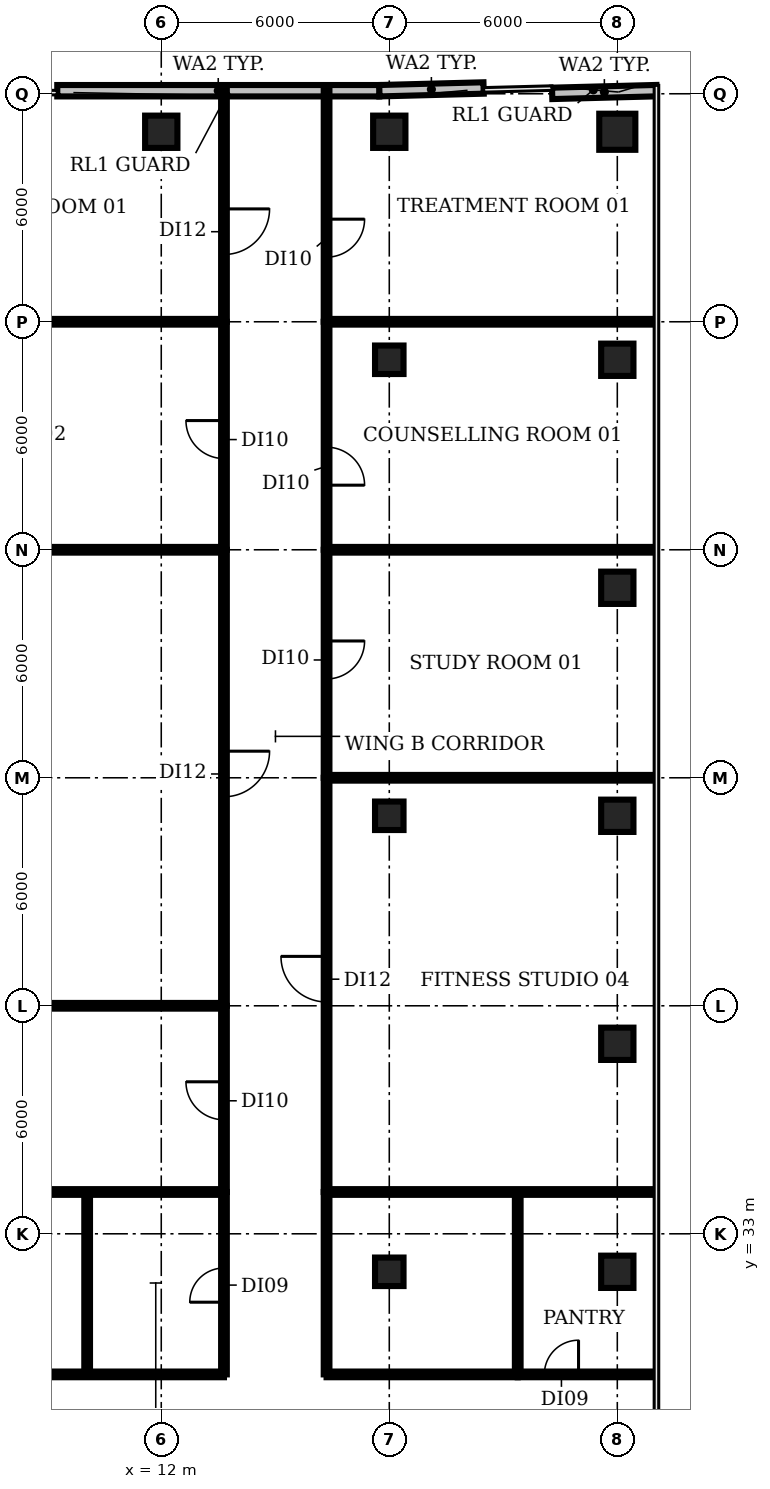
"""IFC4 building model, lengths in metres.
Left out: names, types, materials, properties, quantities, classifications, styles, units other than length and angle.
Written with IfcOpenShell. Run it as: python <this file> out.ifc"""

import sys

from ifc_helpers import new_model, si_unit, direction, frame, frame_2d, origin, origin_2d, place, context, subcontext, project, spatial, rectangle, circle, extrude, element, fill, save


model = new_model("IFC4")
c1 = context("Model", 3, precision=1e-05, world=origin(), true_north=direction((0.0, 1.0)))
c2 = subcontext(c1, "Body", "Model", "MODEL_VIEW")
j1 = project(units=[si_unit("LENGTHUNIT", "METRE"), si_unit("PLANEANGLEUNIT", "RADIAN")], contexts=[c1])
p1 = place(None, origin())
s1 = spatial("IfcSite", under=j1, at=p1, CompositionType="ELEMENT")
p2 = place(p1, origin())
s2 = spatial("IfcBuilding", under=s1, at=p2, CompositionType="ELEMENT")
p3 = place(p2, frame((0.0, 0.0, 176.0)))
s3 = spatial("IfcBuildingStorey", under=s2, at=p3, CompositionType="ELEMENT", Elevation=176.0)
p4 = place(p3, frame((12.0, 62.0, 0.0), z_axis=(0.0, 0.0, 1.0), x_axis=(1.0, 0.0, 0.0)))
e1 = element("IfcColumn", 1, at=p4, inside=s3, PredefinedType="COLUMN", context=c2, shape_type="SweptSolid", body=[
    extrude(rectangle(XDim=0.85, YDim=0.85, at=origin_2d()), origin(), (0.0, 0.0, 1.0), 3.85),
])
for number, where, z_axis, x_axis in (
    (2, (18.0, 32.0, 0.0), (0.0, 0.0, 1.0), (1.0, 0.0, 0.0)),
    (3, (18.0, 44.0, 0.0), (0.0, 0.0, 1.0), (1.0, 0.0, 0.0)),
    (4, (18.0, 56.0, 0.0), (0.0, 0.0, 1.0), (1.0, 0.0, 0.0)),
):
    element("IfcColumn", number, at=place(p3, frame(where, z_axis=z_axis, x_axis=x_axis)), inside=s3, PredefinedType="COLUMN", context=c2, shape_type="SweptSolid", body=[
        extrude(rectangle(XDim=0.75, YDim=0.75, at=origin_2d()), origin(), (0.0, 0.0, 1.0), 3.85),
    ])
for number, where, z_axis, x_axis in (
    (5, (18.0, 62.0, 0.0), (0.0, 0.0, 1.0), (1.0, 0.0, 0.0)),
    (6, (24.0, 32.0, 0.0), (0.0, 0.0, 1.0), (1.0, 0.0, 0.0)),
    (7, (24.0, 38.0, 0.0), (0.0, 0.0, 1.0), (1.0, 0.0, 0.0)),
    (8, (24.0, 44.0, 0.0), (0.0, 0.0, 1.0), (1.0, 0.0, 0.0)),
    (9, (24.0, 50.0, 0.0), (0.0, 0.0, 1.0), (1.0, 0.0, 0.0)),
    (10, (24.0, 56.0, 0.0), (0.0, 0.0, 1.0), (1.0, 0.0, 0.0)),
):
    element("IfcColumn", number, at=place(p3, frame(where, z_axis=z_axis, x_axis=x_axis)), inside=s3, PredefinedType="COLUMN", context=c2, shape_type="SweptSolid", body=[
        extrude(rectangle(XDim=0.85, YDim=0.85, at=origin_2d()), origin(), (0.0, 0.0, 1.0), 3.85),
    ])
p5 = place(p3, frame((24.0, 62.0, 0.0), z_axis=(0.0, 0.0, 1.0), x_axis=(1.0, 0.0, 0.0)))
e11 = element("IfcColumn", 11, at=p5, inside=s3, PredefinedType="COLUMN", context=c2, shape_type="SweptSolid", body=[
    extrude(circle(Radius=0.475, at=origin_2d()), origin(), (0.0, 0.0, 1.0), 3.85),
])
for number, where, z_axis, x_axis in (
    (12, (25.034, 63.082, 0.0), (0.0, 0.0, 1.0), (-1.0, -0.026, 0.0)),
    (13, (20.482, 63.152, 0.0), (0.0, 0.0, 1.0), (-1.0, -0.026, 0.0)),
):
    element("IfcWall", number, at=place(p3, frame(where, z_axis=z_axis, x_axis=x_axis)), inside=s3, PredefinedType="SOLIDWALL", context=c2, shape_type="SweptSolid", body=[
        extrude(rectangle(XDim=2.749, YDim=0.3, at=frame_2d((1.375, 0.0))), origin(), (0.0, 0.0, 1.0), 3.85),
    ])
p6 = place(p3, frame((17.735, 63.08, 0.0), z_axis=(0.0, 0.0, 1.0), x_axis=(-1.0, 0.0, 0.0)))
e14 = element("IfcWall", 14, at=p6, inside=s3, PredefinedType="SOLIDWALL", context=c2, shape_type="SweptSolid", body=[
    extrude(rectangle(XDim=8.471, YDim=0.3, at=frame_2d((4.236, 0.0))), origin(), (0.0, 0.0, 1.0), 3.85),
])
p7 = place(p3, frame((-1.79, 57.0, 0.0), z_axis=(0.0, 0.0, 1.0), x_axis=(1.0, 0.0, 0.0)))
e15 = element("IfcWall", 15, at=p7, inside=s3, PredefinedType="PARTITIONING", context=c2, shape_type="SweptSolid", body=[
    extrude(rectangle(XDim=15.44, YDim=0.15, at=frame_2d((7.72, 0.0))), origin(), (0.0, 0.0, 1.0), 2.88),
])
p8 = place(p3, frame((-1.63, 51.0, 0.0), z_axis=(0.0, 0.0, 1.0), x_axis=(1.0, 0.0, 0.0)))
e16 = element("IfcWall", 16, at=p8, inside=s3, PredefinedType="PARTITIONING", context=c2, shape_type="SweptSolid", body=[
    extrude(rectangle(XDim=15.28, YDim=0.15, at=frame_2d((7.64, 0.0))), origin(), (0.0, 0.0, 1.0), 2.88),
])
p9 = place(p3, frame((-1.32, 39.0, 0.0), z_axis=(0.0, 0.0, 1.0), x_axis=(1.0, 0.0, 0.0)))
e17 = element("IfcWall", 17, at=p9, inside=s3, PredefinedType="PARTITIONING", context=c2, shape_type="SweptSolid", body=[
    extrude(rectangle(XDim=14.97, YDim=0.15, at=frame_2d((7.485, 0.0))), origin(), (0.0, 0.0, 1.0), 2.88),
])
p10 = place(p3, frame((-1.19, 34.1, 0.0), z_axis=(0.0, 0.0, 1.0), x_axis=(1.0, 0.0, 0.0)))
e18 = element("IfcWall", 18, at=p10, inside=s3, PredefinedType="PARTITIONING", context=c2, shape_type="SweptSolid", body=[
    extrude(rectangle(XDim=14.84, YDim=0.15, at=frame_2d((7.42, 0.0))), origin(), (0.0, 0.0, 1.0), 2.88),
])
p11 = place(p3, frame((8.8, 29.3, 0.0), z_axis=(0.0, 0.0, 1.0), x_axis=(1.0, 0.0, 0.0)))
e19 = element("IfcWall", 19, at=p11, inside=s3, PredefinedType="PARTITIONING", context=c2, shape_type="SweptSolid", body=[
    extrude(rectangle(XDim=4.85, YDim=0.15, at=frame_2d((2.425, 0.0))), origin(), (0.0, 0.0, 1.0), 2.88),
])
p12 = place(p3, frame((10.05, 29.3, 0.0), z_axis=(0.0, 0.0, 1.0), x_axis=(0.0, 1.0, 0.0)))
e20 = element("IfcWall", 20, at=p12, inside=s3, PredefinedType="PARTITIONING", context=c2, shape_type="SweptSolid", body=[
    extrude(rectangle(XDim=4.8, YDim=0.15, at=frame_2d((2.4, 0.0))), origin(), (0.0, 0.0, 1.0), 2.88),
])
p13 = place(p3, frame((13.65, 29.3, 0.0), z_axis=(0.0, 0.0, 1.0), x_axis=(0.0, 1.0, 0.0)))
e21 = element("IfcWall", 21, at=p13, inside=s3, PredefinedType="PARTITIONING", context=c2, shape_type="SweptSolid", body=[
    extrude(rectangle(XDim=4.8, YDim=0.15, at=frame_2d((2.4, 0.0))), origin(), (0.0, 0.0, 1.0), 2.88),
])
p14 = place(p13, frame((1.9, 0.0, 0.0)))
e22 = element("IfcOpeningElement", 22, at=p14, cuts=e21, PredefinedType="OPENING", context=c2, shape_type="SweptSolid", body=[
    extrude(rectangle(XDim=0.9, YDim=2.1, at=frame_2d((0.45, 1.05))), frame((0.0, 0.085, 0.0), z_axis=(0.0, -1.0, 0.0), x_axis=(1.0, 0.0, 0.0)), (0.0, 0.0, 1.0), 0.17),
])
p15 = place(p3, frame((13.65, 34.1, 0.0), z_axis=(0.0, 0.0, 1.0), x_axis=(0.0, 1.0, 0.0)))
e23 = element("IfcWall", 23, at=p15, inside=s3, PredefinedType="PARTITIONING", context=c2, shape_type="SweptSolid", body=[
    extrude(rectangle(XDim=4.9, YDim=0.15, at=frame_2d((2.45, 0.0))), origin(), (0.0, 0.0, 1.0), 2.88),
])
p16 = place(p15, frame((1.9, 0.0, 0.0)))
e24 = element("IfcOpeningElement", 24, at=p16, cuts=e23, PredefinedType="OPENING", context=c2, shape_type="SweptSolid", body=[
    extrude(rectangle(XDim=1.0, YDim=2.1, at=frame_2d((0.5, 1.05))), frame((0.0, 0.085, 0.0), z_axis=(0.0, -1.0, 0.0), x_axis=(1.0, 0.0, 0.0)), (0.0, 0.0, 1.0), 0.17),
])
p17 = place(p3, frame((13.65, 51.0, 0.0), z_axis=(0.0, 0.0, 1.0), x_axis=(0.0, -1.0, 0.0)))
e25 = element("IfcWall", 25, at=p17, inside=s3, PredefinedType="PARTITIONING", context=c2, shape_type="SweptSolid", body=[
    extrude(rectangle(XDim=12.0, YDim=0.15, at=frame_2d((6.0, 0.0))), origin(), (0.0, 0.0, 1.0), 2.88),
])
p18 = place(p17, frame((5.3, 0.0, 0.0)))
e26 = element("IfcOpeningElement", 26, at=p18, cuts=e25, PredefinedType="OPENING", context=c2, shape_type="SweptSolid", body=[
    extrude(rectangle(XDim=1.2, YDim=2.1, at=frame_2d((0.6, 1.05))), frame((0.0, 0.085, 0.0), z_axis=(0.0, -1.0, 0.0), x_axis=(1.0, 0.0, 0.0)), (0.0, 0.0, 1.0), 0.17),
])
p19 = place(p3, frame((13.65, 51.0, 0.0), z_axis=(0.0, 0.0, 1.0), x_axis=(0.0, 1.0, 0.0)))
e27 = element("IfcWall", 27, at=p19, inside=s3, PredefinedType="PARTITIONING", context=c2, shape_type="SweptSolid", body=[
    extrude(rectangle(XDim=6.0, YDim=0.15, at=frame_2d((3.0, 0.0))), origin(), (0.0, 0.0, 1.0), 2.88),
])
p20 = place(p19, frame((2.4, 0.0, 0.0)))
e28 = element("IfcOpeningElement", 28, at=p20, cuts=e27, PredefinedType="OPENING", context=c2, shape_type="SweptSolid", body=[
    extrude(rectangle(XDim=1.0, YDim=2.1, at=frame_2d((0.5, 1.05))), frame((0.0, 0.085, 0.0), z_axis=(0.0, -1.0, 0.0), x_axis=(1.0, 0.0, 0.0)), (0.0, 0.0, 1.0), 0.17),
])
p21 = place(p3, frame((13.65, 63.09, 0.0), z_axis=(0.0, 0.0, 1.0), x_axis=(0.0, -1.0, 0.0)))
e29 = element("IfcWall", 29, at=p21, inside=s3, PredefinedType="PARTITIONING", context=c2, shape_type="SweptSolid", body=[
    extrude(rectangle(XDim=6.09, YDim=0.15, at=frame_2d((3.045, 0.0))), origin(), (0.0, 0.0, 1.0), 2.88),
])
p22 = place(p21, frame((3.12, 0.0, 0.0)))
e30 = element("IfcOpeningElement", 30, at=p22, cuts=e29, PredefinedType="OPENING", context=c2, shape_type="SweptSolid", body=[
    extrude(rectangle(XDim=1.2, YDim=2.1, at=frame_2d((0.6, 1.05))), frame((0.0, 0.085, 0.0), z_axis=(0.0, -1.0, 0.0), x_axis=(1.0, 0.0, 0.0)), (0.0, 0.0, 1.0), 0.17),
])
p23 = place(p3, frame((16.35, 29.3, 0.0), z_axis=(0.0, 0.0, 1.0), x_axis=(0.0, 1.0, 0.0)))
e31 = element("IfcWall", 31, at=p23, inside=s3, PredefinedType="PARTITIONING", context=c2, shape_type="SweptSolid", body=[
    extrude(rectangle(XDim=4.8, YDim=0.15, at=frame_2d((2.4, 0.0))), origin(), (0.0, 0.0, 1.0), 2.88),
])
p24 = place(p3, frame((16.35, 29.3, 0.0), z_axis=(0.0, 0.0, 1.0), x_axis=(1.0, 0.0, 0.0)))
e32 = element("IfcWall", 32, at=p24, inside=s3, PredefinedType="PARTITIONING", context=c2, shape_type="SweptSolid", body=[
    extrude(rectangle(XDim=5.03, YDim=0.15, at=frame_2d((2.515, 0.0))), origin(), (0.0, 0.0, 1.0), 2.88),
])
p25 = place(p3, frame((16.35, 34.1, 0.0), z_axis=(0.0, 0.0, 1.0), x_axis=(0.0, 1.0, 0.0)))
e33 = element("IfcWall", 33, at=p25, inside=s3, PredefinedType="PARTITIONING", context=c2, shape_type="SweptSolid", body=[
    extrude(rectangle(XDim=10.9, YDim=0.15, at=frame_2d((5.45, 0.0))), origin(), (0.0, 0.0, 1.0), 2.88),
])
p26 = place(p25, frame((5.0, 0.0, 0.0)))
e34 = element("IfcOpeningElement", 34, at=p26, cuts=e33, PredefinedType="OPENING", context=c2, shape_type="SweptSolid", body=[
    extrude(rectangle(XDim=1.2, YDim=2.1, at=frame_2d((0.6, 1.05))), frame((0.0, 0.085, 0.0), z_axis=(0.0, -1.0, 0.0), x_axis=(1.0, 0.0, 0.0)), (0.0, 0.0, 1.0), 0.17),
])
p27 = place(p3, frame((16.35, 34.1, 0.0), z_axis=(0.0, 0.0, 1.0), x_axis=(1.0, 0.0, 0.0)))
e35 = element("IfcWall", 35, at=p27, inside=s3, PredefinedType="PARTITIONING", context=c2, shape_type="SweptSolid", body=[
    extrude(rectangle(XDim=8.63, YDim=0.15, at=frame_2d((4.315, 0.0))), origin(), (0.0, 0.0, 1.0), 2.88),
])
p28 = place(p3, frame((16.35, 45.0, 0.0), z_axis=(0.0, 0.0, 1.0), x_axis=(1.0, 0.0, 0.0)))
e36 = element("IfcWall", 36, at=p28, inside=s3, PredefinedType="PARTITIONING", context=c2, shape_type="SweptSolid", body=[
    extrude(rectangle(XDim=8.615, YDim=0.15, at=frame_2d((4.308, 0.0))), origin(), (0.0, 0.0, 1.0), 2.88),
])
p29 = place(p3, frame((16.35, 51.0, 0.0), z_axis=(0.0, 0.0, 1.0), x_axis=(0.0, -1.0, 0.0)))
e37 = element("IfcWall", 37, at=p29, inside=s3, PredefinedType="PARTITIONING", context=c2, shape_type="SweptSolid", body=[
    extrude(rectangle(XDim=6.0, YDim=0.15, at=frame_2d((3.0, 0.0))), origin(), (0.0, 0.0, 1.0), 2.88),
])
p30 = place(p29, frame((2.4, 0.0, 0.0)))
e38 = element("IfcOpeningElement", 38, at=p30, cuts=e37, PredefinedType="OPENING", context=c2, shape_type="SweptSolid", body=[
    extrude(rectangle(XDim=1.0, YDim=2.1, at=frame_2d((0.5, 1.05))), frame((0.0, 0.085, 0.0), z_axis=(0.0, -1.0, 0.0), x_axis=(1.0, 0.0, 0.0)), (0.0, 0.0, 1.0), 0.17),
])
p31 = place(p3, frame((16.35, 51.0, 0.0), z_axis=(0.0, 0.0, 1.0), x_axis=(1.0, 0.0, 0.0)))
e39 = element("IfcWall", 39, at=p31, inside=s3, PredefinedType="PARTITIONING", context=c2, shape_type="SweptSolid", body=[
    extrude(rectangle(XDim=8.615, YDim=0.15, at=frame_2d((4.308, 0.0))), origin(), (0.0, 0.0, 1.0), 2.88),
])
p32 = place(p3, frame((16.35, 57.0, 0.0), z_axis=(0.0, 0.0, 1.0), x_axis=(0.0, -1.0, 0.0)))
e40 = element("IfcWall", 40, at=p32, inside=s3, PredefinedType="PARTITIONING", context=c2, shape_type="SweptSolid", body=[
    extrude(rectangle(XDim=6.0, YDim=0.15, at=frame_2d((3.0, 0.0))), origin(), (0.0, 0.0, 1.0), 2.88),
])
p33 = place(p32, frame((3.3, 0.0, 0.0)))
e41 = element("IfcOpeningElement", 41, at=p33, cuts=e40, PredefinedType="OPENING", context=c2, shape_type="SweptSolid", body=[
    extrude(rectangle(XDim=1.0, YDim=2.1, at=frame_2d((0.5, 1.05))), frame((0.0, 0.085, 0.0), z_axis=(0.0, -1.0, 0.0), x_axis=(1.0, 0.0, 0.0)), (0.0, 0.0, 1.0), 0.17),
])
p34 = place(p3, frame((16.35, 57.0, 0.0), z_axis=(0.0, 0.0, 1.0), x_axis=(1.0, 0.0, 0.0)))
e42 = element("IfcWall", 42, at=p34, inside=s3, PredefinedType="PARTITIONING", context=c2, shape_type="SweptSolid", body=[
    extrude(rectangle(XDim=8.615, YDim=0.15, at=frame_2d((4.308, 0.0))), origin(), (0.0, 0.0, 1.0), 2.88),
])
p35 = place(p3, frame((16.35, 63.09, 0.0), z_axis=(0.0, 0.0, 1.0), x_axis=(0.0, -1.0, 0.0)))
e43 = element("IfcWall", 43, at=p35, inside=s3, PredefinedType="PARTITIONING", context=c2, shape_type="SweptSolid", body=[
    extrude(rectangle(XDim=6.09, YDim=0.15, at=frame_2d((3.045, 0.0))), origin(), (0.0, 0.0, 1.0), 2.88),
])
p36 = place(p35, frame((3.39, 0.0, 0.0)))
e44 = element("IfcOpeningElement", 44, at=p36, cuts=e43, PredefinedType="OPENING", context=c2, shape_type="SweptSolid", body=[
    extrude(rectangle(XDim=1.0, YDim=2.1, at=frame_2d((0.5, 1.05))), frame((0.0, 0.085, 0.0), z_axis=(0.0, -1.0, 0.0), x_axis=(1.0, 0.0, 0.0)), (0.0, 0.0, 1.0), 0.17),
])
p37 = place(p3, frame((21.38, 29.3, 0.0), z_axis=(0.0, 0.0, 1.0), x_axis=(0.0, 1.0, 0.0)))
e45 = element("IfcWall", 45, at=p37, inside=s3, PredefinedType="PARTITIONING", context=c2, shape_type="SweptSolid", body=[
    extrude(rectangle(XDim=4.8, YDim=0.15, at=frame_2d((2.4, 0.0))), origin(), (0.0, 0.0, 1.0), 2.88),
])
p38 = place(p3, frame((21.38, 29.3, 0.0), z_axis=(0.0, 0.0, 1.0), x_axis=(1.0, 0.0, 0.0)))
e46 = element("IfcWall", 46, at=p38, inside=s3, PredefinedType="PARTITIONING", context=c2, shape_type="SweptSolid", body=[
    extrude(rectangle(XDim=3.6, YDim=0.15, at=frame_2d((1.8, 0.0))), origin(), (0.0, 0.0, 1.0), 2.88),
])
p39 = place(p38, frame((0.7, 0.0, 0.0)))
e47 = element("IfcOpeningElement", 47, at=p39, cuts=e46, PredefinedType="OPENING", context=c2, shape_type="SweptSolid", body=[
    extrude(rectangle(XDim=0.9, YDim=2.1, at=frame_2d((0.45, 1.05))), frame((0.0, 0.085, 0.0), z_axis=(0.0, -1.0, 0.0), x_axis=(1.0, 0.0, 0.0)), (0.0, 0.0, 1.0), 0.17),
])
p40 = place(p14, origin())
e48 = element("IfcDoor", 48, at=p40, inside=s3, OperationType="SINGLE_SWING_LEFT", PredefinedType="DOOR", context=c2, shape_type="SweptSolid", body=[
    extrude(rectangle(XDim=0.9, YDim=2.1, at=frame_2d((0.45, 1.05))), frame((0.0, 0.025, 0.0), z_axis=(0.0, -1.0, 0.0), x_axis=(1.0, 0.0, 0.0)), (0.0, 0.0, 1.0), 0.05),
])
fill(e22, e48)
p41 = place(p16, origin())
e49 = element("IfcDoor", 49, at=p41, inside=s3, OperationType="SINGLE_SWING_RIGHT", PredefinedType="DOOR", context=c2, shape_type="SweptSolid", body=[
    extrude(rectangle(XDim=1.0, YDim=2.1, at=frame_2d((0.5, 1.05))), frame((0.0, 0.025, 0.0), z_axis=(0.0, -1.0, 0.0), x_axis=(1.0, 0.0, 0.0)), (0.0, 0.0, 1.0), 0.05),
])
fill(e24, e49)
p42 = place(p18, origin())
e50 = element("IfcDoor", 50, at=p42, inside=s3, OperationType="SINGLE_SWING_LEFT", PredefinedType="DOOR", context=c2, shape_type="SweptSolid", body=[
    extrude(rectangle(XDim=1.2, YDim=2.1, at=frame_2d((0.6, 1.05))), frame((0.0, 0.025, 0.0), z_axis=(0.0, -1.0, 0.0), x_axis=(1.0, 0.0, 0.0)), (0.0, 0.0, 1.0), 0.05),
])
fill(e26, e50)
p43 = place(p20, origin())
e51 = element("IfcDoor", 51, at=p43, inside=s3, OperationType="SINGLE_SWING_RIGHT", PredefinedType="DOOR", context=c2, shape_type="SweptSolid", body=[
    extrude(rectangle(XDim=1.0, YDim=2.1, at=frame_2d((0.5, 1.05))), frame((0.0, 0.025, 0.0), z_axis=(0.0, -1.0, 0.0), x_axis=(1.0, 0.0, 0.0)), (0.0, 0.0, 1.0), 0.05),
])
fill(e28, e51)
p44 = place(p22, origin())
e52 = element("IfcDoor", 52, at=p44, inside=s3, OperationType="SINGLE_SWING_LEFT", PredefinedType="DOOR", context=c2, shape_type="SweptSolid", body=[
    extrude(rectangle(XDim=1.2, YDim=2.1, at=frame_2d((0.6, 1.05))), frame((0.0, 0.025, 0.0), z_axis=(0.0, -1.0, 0.0), x_axis=(1.0, 0.0, 0.0)), (0.0, 0.0, 1.0), 0.05),
])
fill(e30, e52)
p45 = place(p26, origin())
e53 = element("IfcDoor", 53, at=p45, inside=s3, OperationType="SINGLE_SWING_RIGHT", PredefinedType="DOOR", context=c2, shape_type="SweptSolid", body=[
    extrude(rectangle(XDim=1.2, YDim=2.1, at=frame_2d((0.6, 1.05))), frame((0.0, 0.025, 0.0), z_axis=(0.0, -1.0, 0.0), x_axis=(1.0, 0.0, 0.0)), (0.0, 0.0, 1.0), 0.05),
])
fill(e34, e53)
p46 = place(p30, origin())
e54 = element("IfcDoor", 54, at=p46, inside=s3, OperationType="SINGLE_SWING_LEFT", PredefinedType="DOOR", context=c2, shape_type="SweptSolid", body=[
    extrude(rectangle(XDim=1.0, YDim=2.1, at=frame_2d((0.5, 1.05))), frame((0.0, 0.025, 0.0), z_axis=(0.0, -1.0, 0.0), x_axis=(1.0, 0.0, 0.0)), (0.0, 0.0, 1.0), 0.05),
])
fill(e38, e54)
p47 = place(p33, origin())
e55 = element("IfcDoor", 55, at=p47, inside=s3, OperationType="SINGLE_SWING_RIGHT", PredefinedType="DOOR", context=c2, shape_type="SweptSolid", body=[
    extrude(rectangle(XDim=1.0, YDim=2.1, at=frame_2d((0.5, 1.05))), frame((0.0, 0.025, 0.0), z_axis=(0.0, -1.0, 0.0), x_axis=(1.0, 0.0, 0.0)), (0.0, 0.0, 1.0), 0.05),
])
fill(e41, e55)
p48 = place(p36, origin())
e56 = element("IfcDoor", 56, at=p48, inside=s3, OperationType="SINGLE_SWING_LEFT", PredefinedType="DOOR", context=c2, shape_type="SweptSolid", body=[
    extrude(rectangle(XDim=1.0, YDim=2.1, at=frame_2d((0.5, 1.05))), frame((0.0, 0.025, 0.0), z_axis=(0.0, -1.0, 0.0), x_axis=(1.0, 0.0, 0.0)), (0.0, 0.0, 1.0), 0.05),
])
fill(e44, e56)
p49 = place(p39, origin())
e57 = element("IfcDoor", 57, at=p49, inside=s3, OperationType="SINGLE_SWING_RIGHT", PredefinedType="DOOR", context=c2, shape_type="SweptSolid", body=[
    extrude(rectangle(XDim=0.9, YDim=2.1, at=frame_2d((0.45, 1.05))), frame((0.0, 0.025, 0.0), z_axis=(0.0, -1.0, 0.0), x_axis=(1.0, 0.0, 0.0)), (0.0, 0.0, 1.0), 0.05),
])
fill(e47, e57)
save(model, sys.argv[1])
